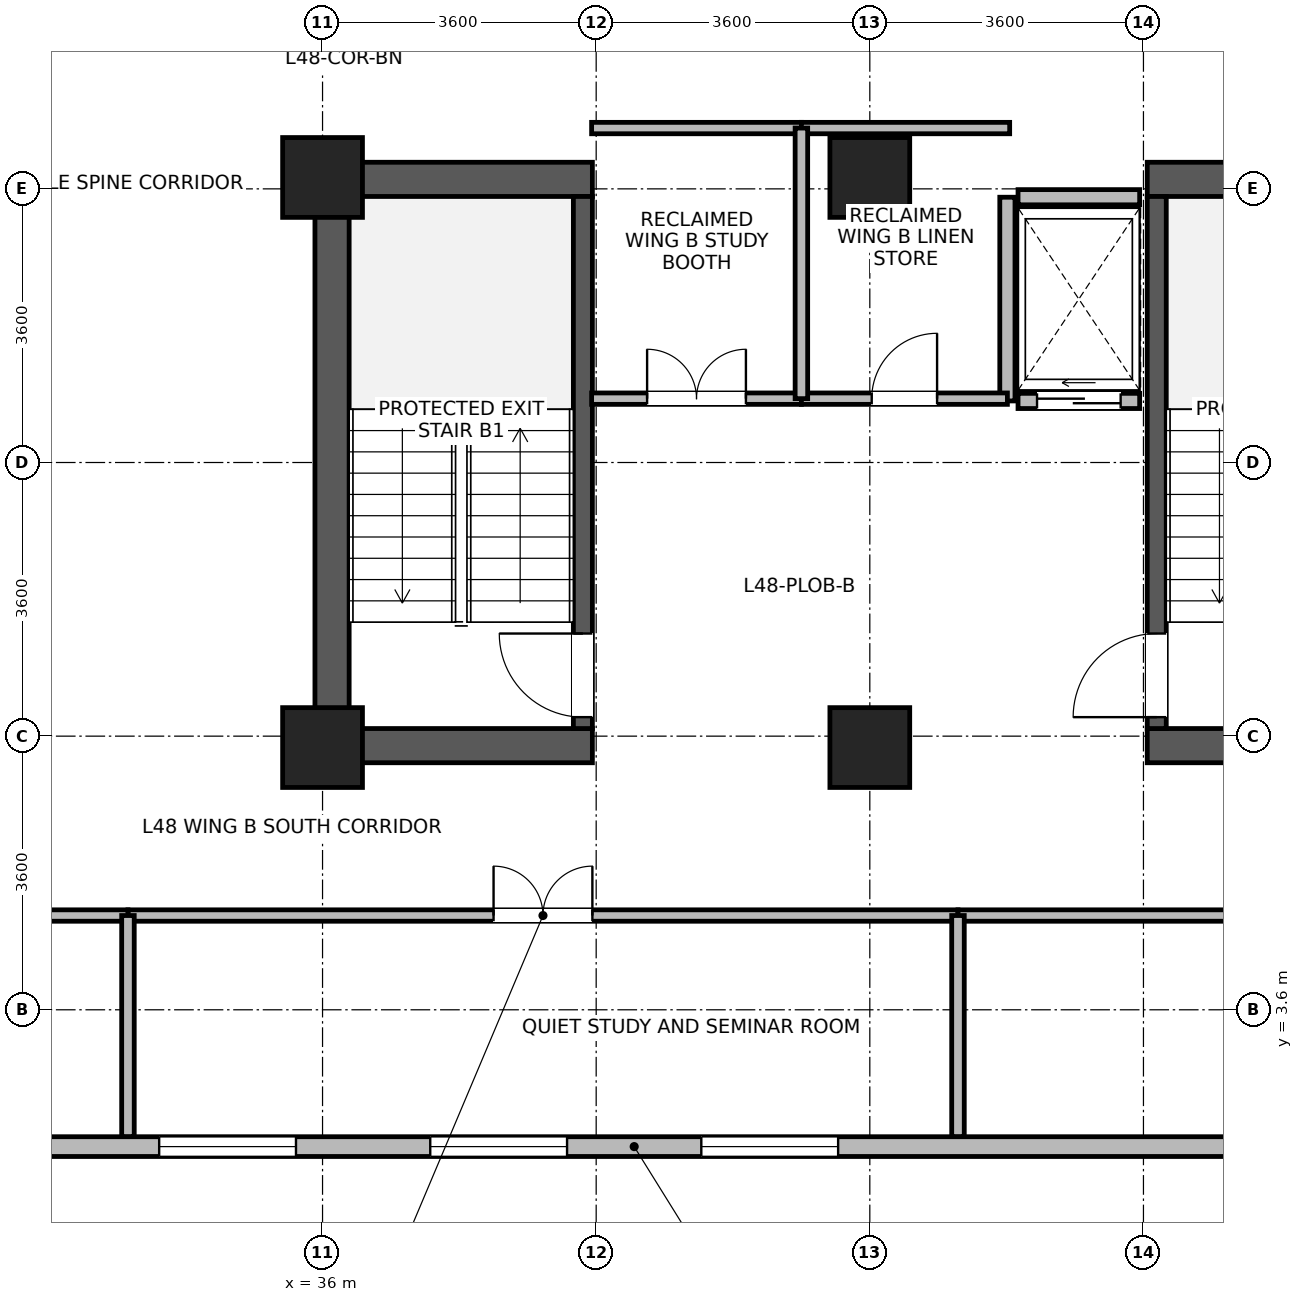
"""IFC4 building model, lengths in metres.
Left out: names, types, materials, properties, quantities, classifications, styles, units other than length and angle.
Written with IfcOpenShell. Run it as: python <this file> out.ifc"""

import sys

from ifc_helpers import new_model, si_unit, direction, frame, frame_2d, origin, origin_2d, place, context, subcontext, project, spatial, rectangle, extrude, source, transform, mapped, element, fill, save


model = new_model("IFC4")
c1 = context("Model", 3, precision=1e-05, world=origin(), true_north=direction((0.0, 1.0)))
c2 = subcontext(c1, "Body", "Model", "MODEL_VIEW")
j1 = project(units=[si_unit("LENGTHUNIT", "METRE"), si_unit("PLANEANGLEUNIT", "RADIAN")], contexts=[c1])
p1 = place(None, origin())
s1 = spatial("IfcSite", under=j1, at=p1, CompositionType="ELEMENT")
p2 = place(p1, origin())
s2 = spatial("IfcBuilding", under=s1, at=p2, CompositionType="ELEMENT")
p3 = place(p2, frame((0.0, 0.0, 188.3)))
s3 = spatial("IfcBuildingStorey", under=s2, at=p3, CompositionType="ELEMENT", Elevation=188.3)
p4 = place(p3, frame((36.125, 6.85, 0.0), z_axis=(0.0, 0.0, 1.0), x_axis=(0.0, 1.0, 0.0)))
e1 = element("IfcWall", 1, at=p4, inside=s3, PredefinedType="SHEAR", context=c2, shape_type="SweptSolid", body=[
    extrude(rectangle(XDim=7.9, YDim=0.45, at=frame_2d((3.95, 0.0))), origin(), (0.0, 0.0, 1.0), 3.34),
])
for number, where, z_axis, x_axis in (
    (2, (36.35, 7.075, 0.0), (0.0, 0.0, 1.0), (1.0, 0.0, 0.0)),
    (3, (46.85, 7.075, 0.0), (0.0, 0.0, 1.0), (1.0, 0.0, 0.0)),
    (4, (36.35, 14.525, 0.0), (0.0, 0.0, 1.0), (1.0, 0.0, 0.0)),
    (5, (46.85, 14.525, 0.0), (0.0, 0.0, 1.0), (1.0, 0.0, 0.0)),
):
    element("IfcWall", number, at=place(p3, frame(where, z_axis=z_axis, x_axis=x_axis)), inside=s3, PredefinedType="SHEAR", context=c2, shape_type="SweptSolid", body=[
        extrude(rectangle(XDim=3.2, YDim=0.45, at=frame_2d((1.6, 0.0))), origin(), (0.0, 0.0, 1.0), 3.34),
    ])
p5 = place(p3, frame((39.425, 7.3, 0.0), z_axis=(0.0, 0.0, 1.0), x_axis=(0.0, 1.0, 0.0)))
e6 = element("IfcWall", 6, at=p5, inside=s3, PredefinedType="SHEAR", context=c2, shape_type="SweptSolid", body=[
    extrude(rectangle(XDim=7.0, YDim=0.25, at=frame_2d((3.5, 0.0))), origin(), (0.0, 0.0, 1.0), 3.34),
])
p6 = place(p5, frame((0.15, 0.0, 0.0)))
e7 = element("IfcOpeningElement", 7, at=p6, cuts=e6, PredefinedType="OPENING", context=c2, shape_type="SweptSolid", body=[
    extrude(rectangle(XDim=1.1, YDim=2.08, at=frame_2d((0.55, 1.04))), frame((0.0, 0.135, 0.0), z_axis=(0.0, -1.0, 0.0), x_axis=(1.0, 0.0, 0.0)), (0.0, 0.0, 1.0), 0.27),
])
p7 = place(p3, frame((46.975, 7.3, 0.0), z_axis=(0.0, 0.0, 1.0), x_axis=(0.0, 1.0, 0.0)))
e8 = element("IfcWall", 8, at=p7, inside=s3, PredefinedType="SHEAR", context=c2, shape_type="SweptSolid", body=[
    extrude(rectangle(XDim=7.0, YDim=0.25, at=frame_2d((3.5, 0.0))), origin(), (0.0, 0.0, 1.0), 3.34),
])
p8 = place(p7, frame((0.15, 0.0, 0.0)))
e9 = element("IfcOpeningElement", 9, at=p8, cuts=e8, PredefinedType="OPENING", context=c2, shape_type="SweptSolid", body=[
    extrude(rectangle(XDim=1.1, YDim=2.08, at=frame_2d((0.55, 1.04))), frame((0.0, 0.135, 0.0), z_axis=(0.0, -1.0, 0.0), x_axis=(1.0, 0.0, 0.0)), (0.0, 0.0, 1.0), 0.27),
])
m1 = source(origin(), c2, "Body", "SweptSolid", [
    extrude(rectangle(XDim=1.05, YDim=1.05, at=origin_2d()), origin(), (0.0, 0.0, 1.0), 3.7),
])
for number, where, z_axis, x_axis in (
    (10, (36.0, 7.05, 0.0), (0.0, 0.0, 1.0), (1.0, 0.0, 0.0)),
    (11, (36.0, 14.55, 0.0), (0.0, 0.0, 1.0), (1.0, 0.0, 0.0)),
    (12, (43.2, 7.05, 0.0), (0.0, 0.0, 1.0), (1.0, 0.0, 0.0)),
    (13, (43.2, 14.55, 0.0), (0.0, 0.0, 1.0), (1.0, 0.0, 0.0)),
):
    element("IfcColumn", number, at=place(p3, frame(where, z_axis=z_axis, x_axis=x_axis)), inside=s3, PredefinedType="COLUMN", context=c2, shape_type="MappedRepresentation", body=[
        mapped(m1, transform((0.0, 0.0, 0.0), x_axis=(1.0, 0.0, 0.0), y_axis=(0.0, 1.0, 0.0), z_axis=(0.0, 0.0, 1.0), scale=1.0)),
    ])
p9 = place(p3, frame((54.365, 1.8, 0.0), z_axis=(0.0, 0.0, 1.0), x_axis=(-1.0, 0.0, 0.0)))
e14 = element("IfcWall", 14, at=p9, inside=s3, PredefinedType="STANDARD", context=c2, shape_type="SweptSolid", body=[
    extrude(rectangle(XDim=28.53, YDim=0.26, at=frame_2d((14.265, 0.0))), origin(), (0.0, 0.0, 1.0), 3.32),
])
p10 = place(p9, frame((0.883, 0.0, 0.85)))
e15 = element("IfcOpeningElement", 15, at=p10, cuts=e14, PredefinedType="OPENING", context=c2, shape_type="SweptSolid", body=[
    extrude(rectangle(XDim=1.8, YDim=1.85, at=frame_2d((0.9, 0.925))), frame((0.0, 0.14, 0.0), z_axis=(0.0, -1.0, 0.0), x_axis=(1.0, 0.0, 0.0)), (0.0, 0.0, 1.0), 0.28),
])
p11 = place(p9, frame((4.449, 0.0, 0.85)))
e16 = element("IfcOpeningElement", 16, at=p11, cuts=e14, PredefinedType="OPENING", context=c2, shape_type="SweptSolid", body=[
    extrude(rectangle(XDim=1.8, YDim=1.85, at=frame_2d((0.9, 0.925))), frame((0.0, 0.14, 0.0), z_axis=(0.0, -1.0, 0.0), x_axis=(1.0, 0.0, 0.0)), (0.0, 0.0, 1.0), 0.28),
])
p12 = place(p9, frame((11.582, 0.0, 0.85)))
e17 = element("IfcOpeningElement", 17, at=p12, cuts=e14, PredefinedType="OPENING", context=c2, shape_type="SweptSolid", body=[
    extrude(rectangle(XDim=1.8, YDim=1.85, at=frame_2d((0.9, 0.925))), frame((0.0, 0.14, 0.0), z_axis=(0.0, -1.0, 0.0), x_axis=(1.0, 0.0, 0.0)), (0.0, 0.0, 1.0), 0.28),
])
p13 = place(p9, frame((15.148, 0.0, 0.85)))
e18 = element("IfcOpeningElement", 18, at=p13, cuts=e14, PredefinedType="OPENING", context=c2, shape_type="SweptSolid", body=[
    extrude(rectangle(XDim=1.8, YDim=1.85, at=frame_2d((0.9, 0.925))), frame((0.0, 0.14, 0.0), z_axis=(0.0, -1.0, 0.0), x_axis=(1.0, 0.0, 0.0)), (0.0, 0.0, 1.0), 0.28),
])
p14 = place(p9, frame((18.714, 0.0, 0.85)))
e19 = element("IfcOpeningElement", 19, at=p14, cuts=e14, PredefinedType="OPENING", context=c2, shape_type="SweptSolid", body=[
    extrude(rectangle(XDim=1.8, YDim=1.85, at=frame_2d((0.9, 0.925))), frame((0.0, 0.14, 0.0), z_axis=(0.0, -1.0, 0.0), x_axis=(1.0, 0.0, 0.0)), (0.0, 0.0, 1.0), 0.28),
])
p15 = place(p9, frame((22.281, 0.0, 0.85)))
e20 = element("IfcOpeningElement", 20, at=p15, cuts=e14, PredefinedType="OPENING", context=c2, shape_type="SweptSolid", body=[
    extrude(rectangle(XDim=1.8, YDim=1.85, at=frame_2d((0.9, 0.925))), frame((0.0, 0.14, 0.0), z_axis=(0.0, -1.0, 0.0), x_axis=(1.0, 0.0, 0.0)), (0.0, 0.0, 1.0), 0.28),
])
p16 = place(p9, frame((25.847, 0.0, 0.85)))
e21 = element("IfcOpeningElement", 21, at=p16, cuts=e14, PredefinedType="OPENING", context=c2, shape_type="SweptSolid", body=[
    extrude(rectangle(XDim=1.8, YDim=1.85, at=frame_2d((0.9, 0.925))), frame((0.0, 0.14, 0.0), z_axis=(0.0, -1.0, 0.0), x_axis=(1.0, 0.0, 0.0)), (0.0, 0.0, 1.0), 0.28),
])
p17 = place(p3, frame((45.15, 11.61, 0.0), z_axis=(0.0, 0.0, 1.0), x_axis=(1.0, 0.0, 0.0)))
e22 = element("IfcWall", 22, at=p17, inside=s3, PredefinedType="PARTITIONING", context=c2, shape_type="SweptSolid", body=[
    extrude(rectangle(XDim=1.6, YDim=0.2, at=frame_2d((0.8, 0.0))), origin(), (0.0, 0.0, 1.0), 3.32),
])
p18 = place(p17, frame((0.25, 0.0, 0.0)))
e23 = element("IfcOpeningElement", 23, at=p18, cuts=e22, PredefinedType="OPENING", context=c2, shape_type="SweptSolid", body=[
    extrude(rectangle(XDim=1.1, YDim=2.12, at=frame_2d((0.55, 1.06))), frame((0.0, 0.11, 0.0), z_axis=(0.0, -1.0, 0.0), x_axis=(1.0, 0.0, 0.0)), (0.0, 0.0, 1.0), 0.22),
])
p19 = place(p3, frame((45.15, 14.29, 0.0), z_axis=(0.0, 0.0, 1.0), x_axis=(1.0, 0.0, 0.0)))
e24 = element("IfcWall", 24, at=p19, inside=s3, PredefinedType="PARTITIONING", context=c2, shape_type="SweptSolid", body=[
    extrude(rectangle(XDim=1.6, YDim=0.2, at=frame_2d((0.8, 0.0))), origin(), (0.0, 0.0, 1.0), 2.32),
])
p20 = place(p3, frame((45.01, 11.61, 0.0), z_axis=(0.0, 0.0, 1.0), x_axis=(0.0, 1.0, 0.0)))
e25 = element("IfcWall", 25, at=p20, inside=s3, PredefinedType="PARTITIONING", context=c2, shape_type="SweptSolid", body=[
    extrude(rectangle(XDim=2.68, YDim=0.2, at=frame_2d((1.34, 0.0))), origin(), (0.0, 0.0, 1.0), 3.32),
])
p21 = place(p3, frame((33.44, 4.84, 0.0), z_axis=(0.0, 0.0, 1.0), x_axis=(1.0, 0.0, 0.0)))
e26 = element("IfcWall", 26, at=p21, inside=s3, PredefinedType="PARTITIONING", context=c2, shape_type="SweptSolid", body=[
    extrude(rectangle(XDim=10.92, YDim=0.15, at=frame_2d((5.46, 0.0))), origin(), (0.0, 0.0, 1.0), 3.32),
])
p22 = place(p21, frame((4.81, 0.0, 0.0)))
e27 = element("IfcOpeningElement", 27, at=p22, cuts=e26, PredefinedType="OPENING", context=c2, shape_type="SweptSolid", body=[
    extrude(rectangle(XDim=1.3, YDim=2.12, at=frame_2d((0.65, 1.06))), frame((0.0, 0.085, 0.0), z_axis=(0.0, -1.0, 0.0), x_axis=(1.0, 0.0, 0.0)), (0.0, 0.0, 1.0), 0.17),
])
p23 = place(p3, frame((44.36, 4.84, 0.0), z_axis=(0.0, 0.0, 1.0), x_axis=(1.0, 0.0, 0.0)))
e28 = element("IfcWall", 28, at=p23, inside=s3, PredefinedType="PARTITIONING", context=c2, shape_type="SweptSolid", body=[
    extrude(rectangle(XDim=10.008, YDim=0.15, at=frame_2d((5.004, 0.0))), origin(), (0.0, 0.0, 1.0), 3.32),
])
p24 = place(p23, frame((4.529, 0.0, 0.0)))
e29 = element("IfcOpeningElement", 29, at=p24, cuts=e28, PredefinedType="OPENING", context=c2, shape_type="SweptSolid", body=[
    extrude(rectangle(XDim=0.95, YDim=2.1, at=frame_2d((0.475, 1.05))), frame((0.0, 0.085, 0.0), z_axis=(0.0, -1.0, 0.0), x_axis=(1.0, 0.0, 0.0)), (0.0, 0.0, 1.0), 0.17),
])
p25 = place(p3, frame((25.832, 4.84, 0.0), z_axis=(0.0, 0.0, 1.0), x_axis=(1.0, 0.0, 0.0)))
e30 = element("IfcWall", 30, at=p25, inside=s3, PredefinedType="PARTITIONING", context=c2, shape_type="SweptSolid", body=[
    extrude(rectangle(XDim=7.608, YDim=0.15, at=frame_2d((3.804, 0.0))), origin(), (0.0, 0.0, 1.0), 3.32),
])
p26 = place(p25, frame((3.154, 0.0, 0.0)))
e31 = element("IfcOpeningElement", 31, at=p26, cuts=e30, PredefinedType="OPENING", context=c2, shape_type="SweptSolid", body=[
    extrude(rectangle(XDim=1.3, YDim=2.12, at=frame_2d((0.65, 1.06))), frame((0.0, 0.085, 0.0), z_axis=(0.0, -1.0, 0.0), x_axis=(1.0, 0.0, 0.0)), (0.0, 0.0, 1.0), 0.17),
])
p27 = place(p3, frame((39.54, 11.64, 0.0), z_axis=(0.0, 0.0, 1.0), x_axis=(1.0, 0.0, 0.0)))
e32 = element("IfcWall", 32, at=p27, inside=s3, PredefinedType="PARTITIONING", context=c2, shape_type="SweptSolid", body=[
    extrude(rectangle(XDim=2.76, YDim=0.15, at=frame_2d((1.38, 0.0))), origin(), (0.0, 0.0, 1.0), 3.32),
])
p28 = place(p27, frame((0.73, 0.0, 0.0)))
e33 = element("IfcOpeningElement", 33, at=p28, cuts=e32, PredefinedType="OPENING", context=c2, shape_type="SweptSolid", body=[
    extrude(rectangle(XDim=1.3, YDim=2.12, at=frame_2d((0.65, 1.06))), frame((0.0, 0.085, 0.0), z_axis=(0.0, -1.0, 0.0), x_axis=(1.0, 0.0, 0.0)), (0.0, 0.0, 1.0), 0.17),
])
p29 = place(p3, frame((39.54, 15.2, 0.0), z_axis=(0.0, 0.0, 1.0), x_axis=(1.0, 0.0, 0.0)))
e34 = element("IfcWall", 34, at=p29, inside=s3, PredefinedType="PARTITIONING", context=c2, shape_type="SweptSolid", body=[
    extrude(rectangle(XDim=2.76, YDim=0.15, at=frame_2d((1.38, 0.0))), origin(), (0.0, 0.0, 1.0), 3.32),
])
p30 = place(p3, frame((42.3, 11.64, 0.0), z_axis=(0.0, 0.0, 1.0), x_axis=(1.0, 0.0, 0.0)))
e35 = element("IfcWall", 35, at=p30, inside=s3, PredefinedType="PARTITIONING", context=c2, shape_type="SweptSolid", body=[
    extrude(rectangle(XDim=2.71, YDim=0.15, at=frame_2d((1.355, 0.0))), origin(), (0.0, 0.0, 1.0), 3.32),
])
p31 = place(p30, frame((0.925, 0.0, 0.0)))
e36 = element("IfcOpeningElement", 36, at=p31, cuts=e35, PredefinedType="OPENING", context=c2, shape_type="SweptSolid", body=[
    extrude(rectangle(XDim=0.86, YDim=2.02, at=frame_2d((0.43, 1.01))), frame((0.0, 0.085, 0.0), z_axis=(0.0, -1.0, 0.0), x_axis=(1.0, 0.0, 0.0)), (0.0, 0.0, 1.0), 0.17),
])
p32 = place(p3, frame((42.3, 15.2, 0.0), z_axis=(0.0, 0.0, 1.0), x_axis=(1.0, 0.0, 0.0)))
e37 = element("IfcWall", 37, at=p32, inside=s3, PredefinedType="PARTITIONING", context=c2, shape_type="SweptSolid", body=[
    extrude(rectangle(XDim=2.74, YDim=0.15, at=frame_2d((1.37, 0.0))), origin(), (0.0, 0.0, 1.0), 3.32),
])
p33 = place(p3, frame((42.3, 11.64, 0.0), z_axis=(0.0, 0.0, 1.0), x_axis=(0.0, 1.0, 0.0)))
e38 = element("IfcWall", 38, at=p33, inside=s3, PredefinedType="PARTITIONING", context=c2, shape_type="SweptSolid", body=[
    extrude(rectangle(XDim=3.56, YDim=0.165, at=frame_2d((1.78, 0.0))), origin(), (0.0, 0.0, 1.0), 3.32),
])
for number, where, z_axis, x_axis in (
    (39, (33.44, 1.932, 0.0), (0.0, 0.0, 1.0), (0.0, 1.0, 0.0)),
    (40, (44.36, 1.932, 0.0), (0.0, 0.0, 1.0), (0.0, 1.0, 0.0)),
):
    element("IfcWall", number, at=place(p3, frame(where, z_axis=z_axis, x_axis=x_axis)), inside=s3, PredefinedType="PARTITIONING", context=c2, shape_type="SweptSolid", body=[
        extrude(rectangle(XDim=2.908, YDim=0.165, at=frame_2d((1.454, 0.0))), origin(), (0.0, 0.0, 1.0), 3.32),
    ])
p34 = place(p12, origin())
e41 = element("IfcWindow", 41, at=p34, inside=s3, PartitioningType="SINGLE_PANEL", PredefinedType="WINDOW", context=c2, shape_type="SweptSolid", body=[
    extrude(rectangle(XDim=1.8, YDim=1.85, at=frame_2d((0.9, 0.925))), frame((0.0, 0.03, 0.0), z_axis=(0.0, -1.0, 0.0), x_axis=(1.0, 0.0, 0.0)), (0.0, 0.0, 1.0), 0.06),
])
fill(e17, e41)
p35 = place(p13, origin())
e42 = element("IfcWindow", 42, at=p35, inside=s3, PartitioningType="SINGLE_PANEL", PredefinedType="WINDOW", context=c2, shape_type="SweptSolid", body=[
    extrude(rectangle(XDim=1.8, YDim=1.85, at=frame_2d((0.9, 0.925))), frame((0.0, 0.03, 0.0), z_axis=(0.0, -1.0, 0.0), x_axis=(1.0, 0.0, 0.0)), (0.0, 0.0, 1.0), 0.06),
])
fill(e18, e42)
p36 = place(p14, origin())
e43 = element("IfcWindow", 43, at=p36, inside=s3, PartitioningType="SINGLE_PANEL", PredefinedType="WINDOW", context=c2, shape_type="SweptSolid", body=[
    extrude(rectangle(XDim=1.8, YDim=1.85, at=frame_2d((0.9, 0.925))), frame((0.0, 0.03, 0.0), z_axis=(0.0, -1.0, 0.0), x_axis=(1.0, 0.0, 0.0)), (0.0, 0.0, 1.0), 0.06),
])
fill(e19, e43)
p37 = place(p6, origin())
e44 = element("IfcDoor", 44, at=p37, inside=s3, OperationType="SINGLE_SWING_RIGHT", PredefinedType="DOOR", context=c2, shape_type="SweptSolid", body=[
    extrude(rectangle(XDim=1.1, YDim=2.08, at=frame_2d((0.55, 1.04))), frame((0.0, 0.025, 0.0), z_axis=(0.0, -1.0, 0.0), x_axis=(1.0, 0.0, 0.0)), (0.0, 0.0, 1.0), 0.05),
])
fill(e7, e44)
p38 = place(p8, origin())
e45 = element("IfcDoor", 45, at=p38, inside=s3, OperationType="SINGLE_SWING_LEFT", PredefinedType="DOOR", context=c2, shape_type="SweptSolid", body=[
    extrude(rectangle(XDim=1.1, YDim=2.08, at=frame_2d((0.55, 1.04))), frame((0.0, 0.025, 0.0), z_axis=(0.0, -1.0, 0.0), x_axis=(1.0, 0.0, 0.0)), (0.0, 0.0, 1.0), 0.05),
])
fill(e9, e45)
p39 = place(p18, origin())
e46 = element("IfcDoor", 46, at=p39, inside=s3, OperationType="SLIDING_TO_LEFT", PredefinedType="DOOR", context=c2, shape_type="SweptSolid", body=[
    extrude(rectangle(XDim=1.1, YDim=2.12, at=frame_2d((0.55, 1.06))), frame((0.0, 0.025, 0.0), z_axis=(0.0, -1.0, 0.0), x_axis=(1.0, 0.0, 0.0)), (0.0, 0.0, 1.0), 0.05),
])
fill(e23, e46)
p40 = place(p22, origin())
e47 = element("IfcDoor", 47, at=p40, inside=s3, OperationType="DOUBLE_DOOR_SINGLE_SWING", PredefinedType="DOOR", context=c2, shape_type="SweptSolid", body=[
    extrude(rectangle(XDim=1.3, YDim=2.12, at=frame_2d((0.65, 1.06))), frame((0.0, 0.025, 0.0), z_axis=(0.0, -1.0, 0.0), x_axis=(1.0, 0.0, 0.0)), (0.0, 0.0, 1.0), 0.05),
])
fill(e27, e47)
p41 = place(p28, origin())
e48 = element("IfcDoor", 48, at=p41, inside=s3, OperationType="DOUBLE_DOOR_SINGLE_SWING", PredefinedType="DOOR", context=c2, shape_type="SweptSolid", body=[
    extrude(rectangle(XDim=1.3, YDim=2.12, at=frame_2d((0.65, 1.06))), frame((0.0, 0.025, 0.0), z_axis=(0.0, -1.0, 0.0), x_axis=(1.0, 0.0, 0.0)), (0.0, 0.0, 1.0), 0.05),
])
fill(e33, e48)
p42 = place(p31, origin())
e49 = element("IfcDoor", 49, at=p42, inside=s3, OperationType="SINGLE_SWING_RIGHT", PredefinedType="DOOR", context=c2, shape_type="SweptSolid", body=[
    extrude(rectangle(XDim=0.86, YDim=2.02, at=frame_2d((0.43, 1.01))), frame((0.0, 0.025, 0.0), z_axis=(0.0, -1.0, 0.0), x_axis=(1.0, 0.0, 0.0)), (0.0, 0.0, 1.0), 0.05),
])
fill(e36, e49)
save(model, sys.argv[1])
